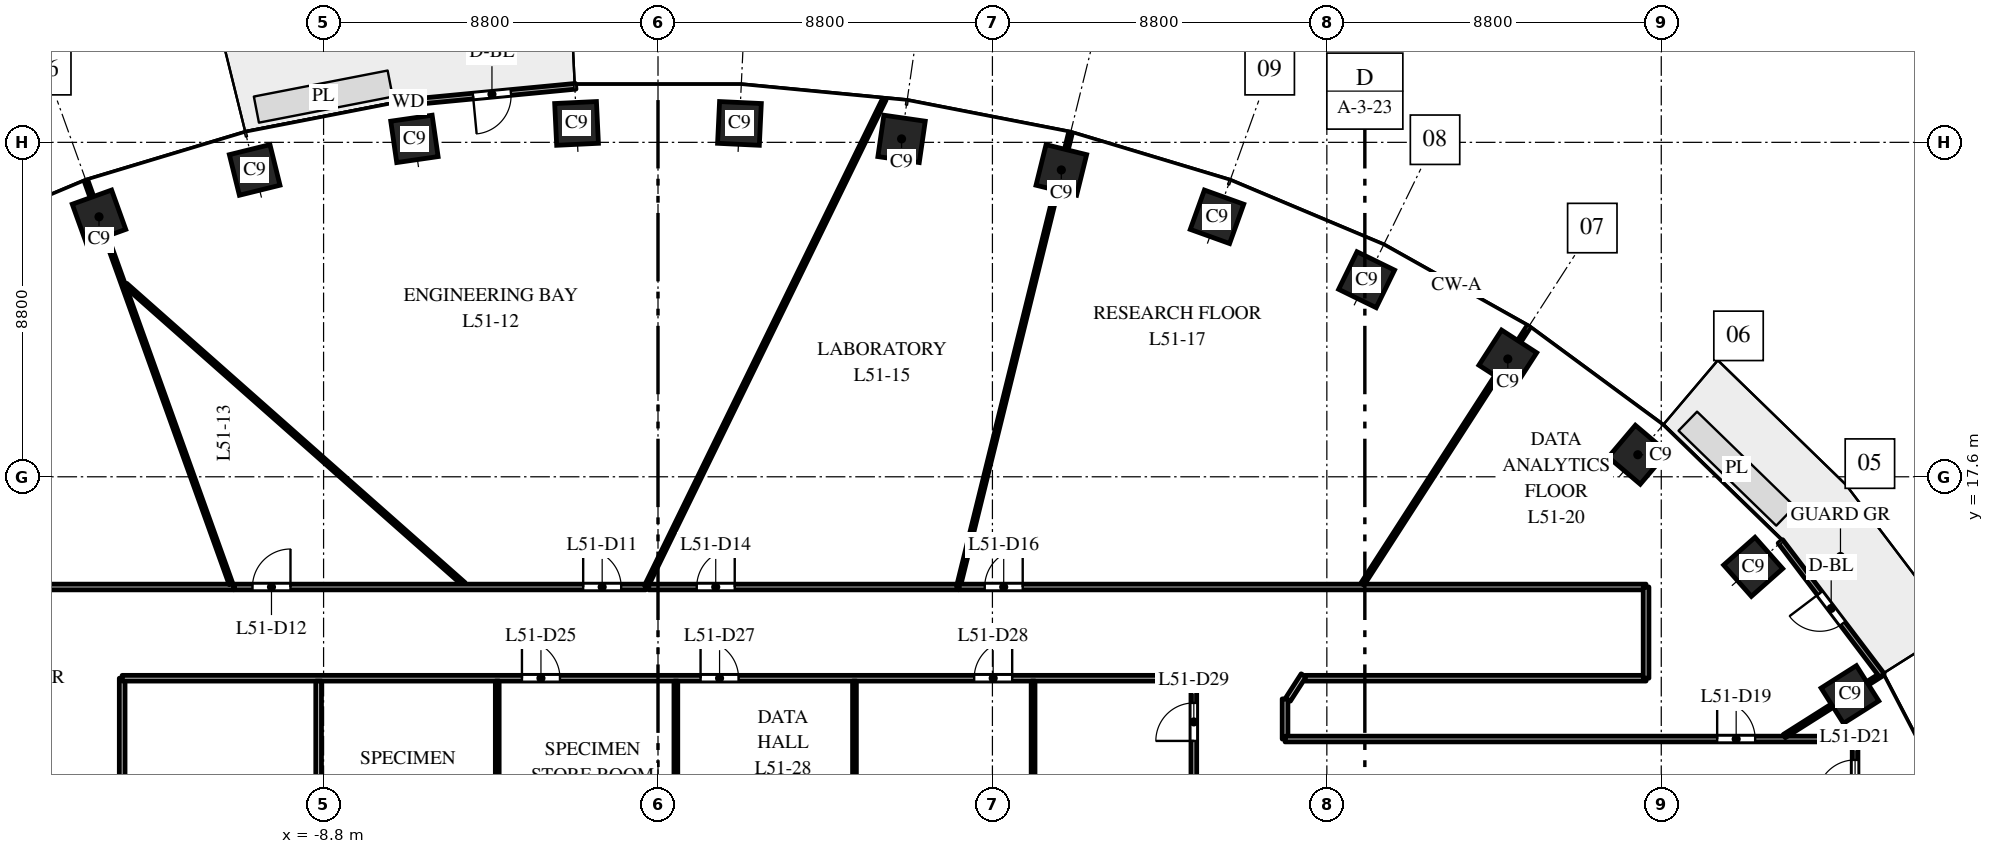
"""IFC4 building model, lengths in metres.
Left out: names, types, materials, properties, quantities, classifications, styles, units other than length and angle.
Written with IfcOpenShell. Run it as: python <this file> out.ifc"""

import sys

from ifc_helpers import new_model, si_unit, direction, frame, frame_2d, origin, origin_2d, place, context, subcontext, project, spatial, rectangle, extrude, element, fill, save


model = new_model("IFC4")
c1 = context("Model", 3, precision=1e-05, world=origin(), true_north=direction((0.0, 1.0)))
c2 = subcontext(c1, "Body", "Model", "MODEL_VIEW")
j1 = project(units=[si_unit("LENGTHUNIT", "METRE"), si_unit("PLANEANGLEUNIT", "RADIAN")], contexts=[c1])
p1 = place(None, origin())
s1 = spatial("IfcSite", under=j1, at=p1, CompositionType="ELEMENT")
p2 = place(p1, origin())
s2 = spatial("IfcBuilding", under=s1, at=p2, CompositionType="ELEMENT")
p3 = place(p2, frame((0.0, 0.0, 245.5)))
s3 = spatial("IfcBuildingStorey", under=s2, at=p3, CompositionType="ELEMENT", Elevation=245.5)
for number, where, z_axis, x_axis in (
    (1, (31.365, 11.871, 0.0), (0.0, 0.0, 1.0), (-0.535, 0.845, 0.0)),
    (2, (28.819, 15.23, 0.0), (0.0, 0.0, 1.0), (-0.663, 0.749, 0.0)),
    (3, (25.783, 18.18, 0.0), (0.0, 0.0, 1.0), (-0.763, 0.646, 0.0)),
    (4, (22.362, 20.7, 0.0), (0.0, 0.0, 1.0), (-0.84, 0.542, 0.0)),
    (5, (18.646, 22.785, 0.0), (0.0, 0.0, 1.0), (-0.898, 0.439, 0.0)),
    (6, (14.709, 24.441, 0.0), (0.0, 0.0, 1.0), (-0.941, 0.338, 0.0)),
    (7, (10.613, 25.674, 0.0), (0.0, 0.0, 1.0), (-0.971, 0.24, 0.0)),
    (8, (6.409, 26.491, 0.0), (0.0, 0.0, 1.0), (-0.99, 0.143, 0.0)),
    (9, (2.143, 26.898, 0.0), (0.0, 0.0, 1.0), (-0.999, 0.048, 0.0)),
    (10, (-2.143, 26.898, 0.0), (0.0, 0.0, 1.0), (-0.999, -0.048, 0.0)),
    (11, (-6.409, 26.491, 0.0), (0.0, 0.0, 1.0), (-0.99, -0.143, 0.0)),
    (12, (-10.613, 25.674, 0.0), (0.0, 0.0, 1.0), (-0.971, -0.24, 0.0)),
    (13, (-14.709, 24.441, 0.0), (0.0, 0.0, 1.0), (-0.941, -0.338, 0.0)),
):
    element("IfcColumn", number, at=place(p3, frame(where, z_axis=z_axis, x_axis=x_axis)), inside=s3, PredefinedType="COLUMN", context=c2, shape_type="SweptSolid", body=[
        extrude(rectangle(XDim=1.1, YDim=1.1, at=origin_2d()), origin(), (0.0, 0.0, 1.0), 4.0),
    ])
p4 = place(p3, frame((32.208, 12.374, 0.0), z_axis=(0.0, 0.0, 1.0), x_axis=(-0.604045763106, 0.796949632081, 0.0)))
e14 = element("IfcWall", 14, at=p4, inside=s3, PredefinedType="STANDARD", context=c2, shape_type="SweptSolid", body=[
    extrude(rectangle(XDim=4.423, YDim=0.15, at=frame_2d((2.212, 0.0))), origin(), (0.0, 0.0, 1.0), 3.7),
])
p5 = place(p4, frame((1.712, 0.0, 0.0)))
e15 = element("IfcOpeningElement", 15, at=p5, cuts=e14, PredefinedType="OPENING", context=c2, shape_type="SweptSolid", body=[
    extrude(rectangle(XDim=1.0, YDim=2.4, at=frame_2d((0.5, 1.2))), frame((0.0, 0.085, 0.0), z_axis=(0.0, -1.0, 0.0), x_axis=(1.0, 0.0, 0.0)), (0.0, 0.0, 1.0), 0.17),
])
p6 = place(p3, frame((-2.166, 27.875, 0.0), z_axis=(0.0, 0.0, 1.0), x_axis=(-0.995473879823, -0.095035543824, 0.0)))
e16 = element("IfcWall", 16, at=p6, inside=s3, PredefinedType="STANDARD", context=c2, shape_type="SweptSolid", body=[
    extrude(rectangle(XDim=4.426, YDim=0.15, at=frame_2d((2.213, 0.0))), origin(), (0.0, 0.0, 1.0), 3.7),
])
p7 = place(p6, frame((1.713, 0.0, 0.0)))
e17 = element("IfcOpeningElement", 17, at=p7, cuts=e16, PredefinedType="OPENING", context=c2, shape_type="SweptSolid", body=[
    extrude(rectangle(XDim=1.0, YDim=2.4, at=frame_2d((0.5, 1.2))), frame((0.0, 0.085, 0.0), z_axis=(0.0, -1.0, 0.0), x_axis=(1.0, 0.0, 0.0)), (0.0, 0.0, 1.0), 0.17),
])
p8 = place(p3, frame((-26.0, 14.7, 0.0), z_axis=(0.0, 0.0, 1.0), x_axis=(1.0, 0.0, 0.0)))
e18 = element("IfcWall", 18, at=p8, inside=s3, PredefinedType="PARTITIONING", context=c2, shape_type="SweptSolid", body=[
    extrude(rectangle(XDim=14.834, YDim=0.15, at=frame_2d((7.417, 0.0))), origin(), (0.0, 0.0, 1.0), 2.75),
])
p9 = place(p8, frame((3.643, 0.0, 0.0)))
e19 = element("IfcOpeningElement", 19, at=p9, cuts=e18, PredefinedType="OPENING", context=c2, shape_type="SweptSolid", body=[
    extrude(rectangle(XDim=1.0, YDim=2.1, at=frame_2d((0.5, 1.05))), frame((0.0, 0.085, 0.0), z_axis=(0.0, -1.0, 0.0), x_axis=(1.0, 0.0, 0.0)), (0.0, 0.0, 1.0), 0.17),
])
p10 = place(p3, frame((-15.048, 25.383, 0.0), z_axis=(0.0, 0.0, 1.0), x_axis=(0.338188533117, -0.941078379344, 0.0)))
e20 = element("IfcWall", 20, at=p10, inside=s3, PredefinedType="PARTITIONING", context=c2, shape_type="SweptSolid", body=[
    extrude(rectangle(XDim=11.269, YDim=0.1, at=frame_2d((5.635, 0.0))), origin(), (0.0, 0.0, 1.0), 3.0),
])
p11 = place(p3, frame((-14.1, -12.3, 0.0), z_axis=(0.0, 0.0, 1.0), x_axis=(0.0, 1.0, 0.0)))
e21 = element("IfcWall", 21, at=p11, inside=s3, PredefinedType="PARTITIONING", context=c2, shape_type="SweptSolid", body=[
    extrude(rectangle(XDim=24.6, YDim=0.15, at=frame_2d((12.3, 0.0))), origin(), (0.0, 0.0, 1.0), 2.75),
])
p12 = place(p11, frame((0.65, 0.0, 0.0)))
e22 = element("IfcOpeningElement", 22, at=p12, cuts=e21, PredefinedType="OPENING", context=c2, shape_type="SweptSolid", body=[
    extrude(rectangle(XDim=1.0, YDim=2.1, at=frame_2d((0.5, 1.05))), frame((0.0, 0.085, 0.0), z_axis=(0.0, -1.0, 0.0), x_axis=(1.0, 0.0, 0.0)), (0.0, 0.0, 1.0), 0.17),
])
p13 = place(p3, frame((-14.1, 12.3, 0.0), z_axis=(0.0, 0.0, 1.0), x_axis=(1.0, 0.0, 0.0)))
e23 = element("IfcWall", 23, at=p13, inside=s3, PredefinedType="PARTITIONING", context=c2, shape_type="SweptSolid", body=[
    extrude(rectangle(XDim=28.2, YDim=0.15, at=frame_2d((14.1, 0.0))), origin(), (0.0, 0.0, 1.0), 2.85),
])
p14 = place(p13, frame((10.52, 0.0, 0.0)))
e24 = element("IfcOpeningElement", 24, at=p14, cuts=e23, PredefinedType="OPENING", context=c2, shape_type="SweptSolid", body=[
    extrude(rectangle(XDim=1.0, YDim=2.1, at=frame_2d((0.5, 1.05))), frame((0.0, 0.085, 0.0), z_axis=(0.0, -1.0, 0.0), x_axis=(1.0, 0.0, 0.0)), (0.0, 0.0, 1.0), 0.17),
])
p15 = place(p13, frame((15.22, 0.0, 0.0)))
e25 = element("IfcOpeningElement", 25, at=p15, cuts=e23, PredefinedType="OPENING", context=c2, shape_type="SweptSolid", body=[
    extrude(rectangle(XDim=1.0, YDim=2.1, at=frame_2d((0.5, 1.05))), frame((0.0, 0.085, 0.0), z_axis=(0.0, -1.0, 0.0), x_axis=(1.0, 0.0, 0.0)), (0.0, 0.0, 1.0), 0.17),
])
p16 = place(p13, frame((22.42, 0.0, 0.0)))
e26 = element("IfcOpeningElement", 26, at=p16, cuts=e23, PredefinedType="OPENING", context=c2, shape_type="SweptSolid", body=[
    extrude(rectangle(XDim=1.0, YDim=2.1, at=frame_2d((0.5, 1.05))), frame((0.0, 0.085, 0.0), z_axis=(0.0, -1.0, 0.0), x_axis=(1.0, 0.0, 0.0)), (0.0, 0.0, 1.0), 0.17),
])
p17 = place(p3, frame((-14.014, 22.654, 0.0), z_axis=(0.0, 0.0, 1.0), x_axis=(0.749061235459, -0.66250076644, 0.0)))
e27 = element("IfcWall", 27, at=p17, inside=s3, PredefinedType="PARTITIONING", context=c2, shape_type="SweptSolid", body=[
    extrude(rectangle(XDim=11.888, YDim=0.1, at=frame_2d((5.944, 0.0))), origin(), (0.0, 0.0, 1.0), 2.85),
])
p18 = place(p3, frame((-11.154, 14.7, 0.0), z_axis=(0.0, 0.0, 1.0), x_axis=(1.0, 0.0, 0.0)))
e28 = element("IfcWall", 28, at=p18, inside=s3, PredefinedType="PARTITIONING", context=c2, shape_type="SweptSolid", body=[
    extrude(rectangle(XDim=10.835, YDim=0.15, at=frame_2d((5.417, 0.0))), origin(), (0.0, 0.0, 1.0), 2.85),
])
p19 = place(p18, frame((9.185, 0.0, 0.0)))
e29 = element("IfcOpeningElement", 29, at=p19, cuts=e28, PredefinedType="OPENING", context=c2, shape_type="SweptSolid", body=[
    extrude(rectangle(XDim=1.0, YDim=2.1, at=frame_2d((0.5, 1.05))), frame((0.0, 0.085, 0.0), z_axis=(0.0, -1.0, 0.0), x_axis=(1.0, 0.0, 0.0)), (0.0, 0.0, 1.0), 0.17),
])
p20 = place(p18, frame((0.483, 0.0, 0.0)))
e30 = element("IfcOpeningElement", 30, at=p20, cuts=e28, PredefinedType="OPENING", context=c2, shape_type="SweptSolid", body=[
    extrude(rectangle(XDim=1.0, YDim=2.1, at=frame_2d((0.5, 1.05))), frame((0.0, 0.085, 0.0), z_axis=(0.0, -1.0, 0.0), x_axis=(1.0, 0.0, 0.0)), (0.0, 0.0, 1.0), 0.17),
])
p21 = place(p3, frame((-8.93, 0.518, 0.0), z_axis=(0.0, 0.0, 1.0), x_axis=(0.0, 1.0, 0.0)))
e31 = element("IfcWall", 31, at=p21, inside=s3, PredefinedType="PARTITIONING", context=c2, shape_type="SweptSolid", body=[
    extrude(rectangle(XDim=11.707, YDim=0.15, at=frame_2d((5.854, 0.0))), origin(), (0.0, 0.0, 1.0), 2.75),
])
p22 = place(p21, frame((4.11, 0.0, 0.0)))
e32 = element("IfcOpeningElement", 32, at=p22, cuts=e31, PredefinedType="OPENING", context=c2, shape_type="SweptSolid", body=[
    extrude(rectangle(XDim=1.0, YDim=2.1, at=frame_2d((0.5, 1.05))), frame((0.0, 0.085, 0.0), z_axis=(0.0, -1.0, 0.0), x_axis=(1.0, 0.0, 0.0)), (0.0, 0.0, 1.0), 0.17),
])
p23 = place(p3, frame((-4.23, 6.592, 0.0), z_axis=(0.0, 0.0, 1.0), x_axis=(0.0, 1.0, 0.0)))
e33 = element("IfcWall", 33, at=p23, inside=s3, PredefinedType="PARTITIONING", context=c2, shape_type="SweptSolid", body=[
    extrude(rectangle(XDim=5.633, YDim=0.1, at=frame_2d((2.816, 0.0))), origin(), (0.0, 0.0, 1.0), 2.85),
])
p24 = place(p3, frame((-0.312, 14.716, 0.0), z_axis=(0.0, 0.0, 1.0), x_axis=(0.439293576349, 0.898343561105, 0.0)))
e34 = element("IfcWall", 34, at=p24, inside=s3, PredefinedType="PARTITIONING", context=c2, shape_type="SweptSolid", body=[
    extrude(rectangle(XDim=14.273, YDim=0.1, at=frame_2d((7.136, 0.0))), origin(), (0.0, 0.0, 1.0), 3.0),
])
p25 = place(p3, frame((-0.244, 14.7, 0.0), z_axis=(0.0, 0.0, 1.0), x_axis=(1.0, 0.0, 0.0)))
e35 = element("IfcWall", 35, at=p25, inside=s3, PredefinedType="PARTITIONING", context=c2, shape_type="SweptSolid", body=[
    extrude(rectangle(XDim=8.147, YDim=0.15, at=frame_2d((4.073, 0.0))), origin(), (0.0, 0.0, 1.0), 2.85),
])
p26 = place(p25, frame((1.263, 0.0, 0.0)))
e36 = element("IfcOpeningElement", 36, at=p26, cuts=e35, PredefinedType="OPENING", context=c2, shape_type="SweptSolid", body=[
    extrude(rectangle(XDim=1.0, YDim=2.1, at=frame_2d((0.5, 1.05))), frame((0.0, 0.085, 0.0), z_axis=(0.0, -1.0, 0.0), x_axis=(1.0, 0.0, 0.0)), (0.0, 0.0, 1.0), 0.17),
])
p27 = place(p3, frame((0.47, 7.469, 0.0), z_axis=(0.0, 0.0, 1.0), x_axis=(0.0, 1.0, 0.0)))
e37 = element("IfcWall", 37, at=p27, inside=s3, PredefinedType="PARTITIONING", context=c2, shape_type="SweptSolid", body=[
    extrude(rectangle(XDim=4.756, YDim=0.1, at=frame_2d((2.378, 0.0))), origin(), (0.0, 0.0, 1.0), 3.0),
])
p28 = place(p3, frame((5.17, 6.105, 0.0), z_axis=(0.0, 0.0, 1.0), x_axis=(0.0, 1.0, 0.0)))
e38 = element("IfcWall", 38, at=p28, inside=s3, PredefinedType="PARTITIONING", context=c2, shape_type="SweptSolid", body=[
    extrude(rectangle(XDim=6.12, YDim=0.1, at=frame_2d((3.06, 0.0))), origin(), (0.0, 0.0, 1.0), 2.85),
])
p29 = place(p3, frame((7.903, 14.7, 0.0), z_axis=(0.0, 0.0, 1.0), x_axis=(0.239738210493, 0.9708375716, 0.0)))
e39 = element("IfcWall", 39, at=p29, inside=s3, PredefinedType="PARTITIONING", context=c2, shape_type="SweptSolid", body=[
    extrude(rectangle(XDim=12.305, YDim=0.1, at=frame_2d((6.152, 0.0))), origin(), (0.0, 0.0, 1.0), 3.0),
])
p30 = place(p3, frame((7.919, 14.7, 0.0), z_axis=(0.0, 0.0, 1.0), x_axis=(1.0, 0.0, 0.0)))
e40 = element("IfcWall", 40, at=p30, inside=s3, PredefinedType="PARTITIONING", context=c2, shape_type="SweptSolid", body=[
    extrude(rectangle(XDim=18.081, YDim=0.15, at=frame_2d((9.041, 0.0))), origin(), (0.0, 0.0, 1.0), 2.85),
])
p31 = place(p30, frame((0.678, 0.0, 0.0)))
e41 = element("IfcOpeningElement", 41, at=p31, cuts=e40, PredefinedType="OPENING", context=c2, shape_type="SweptSolid", body=[
    extrude(rectangle(XDim=1.0, YDim=2.1, at=frame_2d((0.5, 1.05))), frame((0.0, 0.085, 0.0), z_axis=(0.0, -1.0, 0.0), x_axis=(1.0, 0.0, 0.0)), (0.0, 0.0, 1.0), 0.17),
])
p32 = place(p3, frame((9.87, -12.225, 0.0), z_axis=(0.0, 0.0, 1.0), x_axis=(0.0, 1.0, 0.0)))
e42 = element("IfcWall", 42, at=p32, inside=s3, PredefinedType="PARTITIONING", context=c2, shape_type="SweptSolid", body=[
    extrude(rectangle(XDim=24.45, YDim=0.1, at=frame_2d((12.225, 0.0))), origin(), (0.0, 0.0, 1.0), 2.75),
])
p33 = place(p3, frame((14.1, -12.3, 0.0), z_axis=(0.0, 0.0, 1.0), x_axis=(0.0, 1.0, 0.0)))
e43 = element("IfcWall", 43, at=p33, inside=s3, PredefinedType="PARTITIONING", context=c2, shape_type="SweptSolid", body=[
    extrude(rectangle(XDim=24.6, YDim=0.15, at=frame_2d((12.3, 0.0))), origin(), (0.0, 0.0, 1.0), 2.75),
])
p34 = place(p33, frame((22.95, 0.0, 0.0)))
e44 = element("IfcOpeningElement", 44, at=p34, cuts=e43, PredefinedType="OPENING", context=c2, shape_type="SweptSolid", body=[
    extrude(rectangle(XDim=1.0, YDim=2.1, at=frame_2d((0.5, 1.05))), frame((0.0, 0.085, 0.0), z_axis=(0.0, -1.0, 0.0), x_axis=(1.0, 0.0, 0.0)), (0.0, 0.0, 1.0), 0.17),
])
p35 = place(p3, frame((16.5, 10.7, 0.0), z_axis=(0.0, 0.0, 1.0), x_axis=(0.0, 1.0, 0.0)))
e45 = element("IfcWall", 45, at=p35, inside=s3, PredefinedType="PARTITIONING", context=c2, shape_type="SweptSolid", body=[
    extrude(rectangle(XDim=1.056, YDim=0.15, at=frame_2d((0.528, 0.0))), origin(), (0.0, 0.0, 1.0), 3.7),
])
p36 = place(p3, frame((16.5, 10.7, 0.0), z_axis=(0.0, 0.0, 1.0), x_axis=(1.0, 0.0, 0.0)))
e46 = element("IfcWall", 46, at=p36, inside=s3, PredefinedType="PARTITIONING", context=c2, shape_type="SweptSolid", body=[
    extrude(rectangle(XDim=15.0, YDim=0.15, at=frame_2d((7.5, 0.0))), origin(), (0.0, 0.0, 1.0), 2.75),
])
p37 = place(p36, frame((11.371, 0.0, 0.0)))
e47 = element("IfcOpeningElement", 47, at=p37, cuts=e46, PredefinedType="OPENING", context=c2, shape_type="SweptSolid", body=[
    extrude(rectangle(XDim=1.0, YDim=2.1, at=frame_2d((0.5, 1.05))), frame((0.0, 0.085, 0.0), z_axis=(0.0, -1.0, 0.0), x_axis=(1.0, 0.0, 0.0)), (0.0, 0.0, 1.0), 0.17),
])
p38 = place(p3, frame((16.577, 11.737, 0.0), z_axis=(0.0, 0.0, 1.0), x_axis=(0.541716486253, 0.840561269939, 0.0)))
e48 = element("IfcWall", 48, at=p38, inside=s3, PredefinedType="PARTITIONING", context=c2, shape_type="SweptSolid", body=[
    extrude(rectangle(XDim=0.759, YDim=0.15, at=frame_2d((0.379, 0.0))), origin(), (0.0, 0.0, 1.0), 3.7),
])
p39 = place(p3, frame((17.029, 12.3, 0.0), z_axis=(0.0, 0.0, 1.0), x_axis=(1.0, 0.0, 0.0)))
e49 = element("IfcWall", 49, at=p39, inside=s3, PredefinedType="PARTITIONING", context=c2, shape_type="SweptSolid", body=[
    extrude(rectangle(XDim=8.971, YDim=0.15, at=frame_2d((4.485, 0.0))), origin(), (0.0, 0.0, 1.0), 2.75),
])
p40 = place(p3, frame((18.538, 14.775, 0.0), z_axis=(0.0, 0.0, 1.0), x_axis=(0.542221460331, 0.840235614549, 0.0)))
e50 = element("IfcWall", 50, at=p40, inside=s3, PredefinedType="PARTITIONING", context=c2, shape_type="SweptSolid", body=[
    extrude(rectangle(XDim=8.054, YDim=0.1, at=frame_2d((4.027, 0.0))), origin(), (0.0, 0.0, 1.0), 3.7),
])
p41 = place(p3, frame((26.0, 12.3, 0.0), z_axis=(0.0, 0.0, 1.0), x_axis=(0.0, 1.0, 0.0)))
e51 = element("IfcWall", 51, at=p41, inside=s3, PredefinedType="PARTITIONING", context=c2, shape_type="SweptSolid", body=[
    extrude(rectangle(XDim=2.4, YDim=0.15, at=frame_2d((1.2, 0.0))), origin(), (0.0, 0.0, 1.0), 2.75),
])
p42 = place(p3, frame((29.637, 10.777, 0.0), z_axis=(0.0, 0.0, 1.0), x_axis=(0.844810627195, 0.535065420467, 0.0)))
e52 = element("IfcWall", 52, at=p42, inside=s3, PredefinedType="PARTITIONING", context=c2, shape_type="SweptSolid", body=[
    extrude(rectangle(XDim=3.048, YDim=0.1, at=frame_2d((1.524, 0.0))), origin(), (0.0, 0.0, 1.0), 3.0),
])
p43 = place(p3, frame((31.5, 8.5, 0.0), z_axis=(0.0, 0.0, 1.0), x_axis=(0.0, 1.0, 0.0)))
e53 = element("IfcWall", 53, at=p43, inside=s3, PredefinedType="PARTITIONING", context=c2, shape_type="SweptSolid", body=[
    extrude(rectangle(XDim=2.2, YDim=0.15, at=frame_2d((1.1, 0.0))), origin(), (0.0, 0.0, 1.0), 3.0),
])
p44 = place(p43, frame((0.65, 0.0, 0.0)))
e54 = element("IfcOpeningElement", 54, at=p44, cuts=e53, PredefinedType="OPENING", context=c2, shape_type="SweptSolid", body=[
    extrude(rectangle(XDim=1.0, YDim=2.1, at=frame_2d((0.5, 1.05))), frame((0.0, 0.085, 0.0), z_axis=(0.0, -1.0, 0.0), x_axis=(1.0, 0.0, 0.0)), (0.0, 0.0, 1.0), 0.17),
])
p45 = place(p5, origin())
e55 = element("IfcDoor", 55, at=p45, inside=s3, OperationType="SINGLE_SWING_RIGHT", PredefinedType="DOOR", context=c2, shape_type="SweptSolid", body=[
    extrude(rectangle(XDim=1.0, YDim=2.4, at=frame_2d((0.5, 1.2))), frame((0.0, 0.025, 0.0), z_axis=(0.0, -1.0, 0.0), x_axis=(1.0, 0.0, 0.0)), (0.0, 0.0, 1.0), 0.05),
])
fill(e15, e55)
p46 = place(p7, origin())
e56 = element("IfcDoor", 56, at=p46, inside=s3, OperationType="SINGLE_SWING_RIGHT", PredefinedType="DOOR", context=c2, shape_type="SweptSolid", body=[
    extrude(rectangle(XDim=1.0, YDim=2.4, at=frame_2d((0.5, 1.2))), frame((0.0, 0.025, 0.0), z_axis=(0.0, -1.0, 0.0), x_axis=(1.0, 0.0, 0.0)), (0.0, 0.0, 1.0), 0.05),
])
fill(e17, e56)
p47 = place(p19, origin())
e57 = element("IfcDoor", 57, at=p47, inside=s3, OperationType="SINGLE_SWING_LEFT", PredefinedType="DOOR", context=c2, shape_type="SweptSolid", body=[
    extrude(rectangle(XDim=1.0, YDim=2.1, at=frame_2d((0.5, 1.05))), frame((0.0, 0.025, 0.0), z_axis=(0.0, -1.0, 0.0), x_axis=(1.0, 0.0, 0.0)), (0.0, 0.0, 1.0), 0.05),
])
fill(e29, e57)
p48 = place(p20, origin())
e58 = element("IfcDoor", 58, at=p48, inside=s3, OperationType="SINGLE_SWING_RIGHT", PredefinedType="DOOR", context=c2, shape_type="SweptSolid", body=[
    extrude(rectangle(XDim=1.0, YDim=2.1, at=frame_2d((0.5, 1.05))), frame((0.0, 0.025, 0.0), z_axis=(0.0, -1.0, 0.0), x_axis=(1.0, 0.0, 0.0)), (0.0, 0.0, 1.0), 0.05),
])
fill(e30, e58)
p49 = place(p26, origin())
e59 = element("IfcDoor", 59, at=p49, inside=s3, OperationType="SINGLE_SWING_RIGHT", PredefinedType="DOOR", context=c2, shape_type="SweptSolid", body=[
    extrude(rectangle(XDim=1.0, YDim=2.1, at=frame_2d((0.5, 1.05))), frame((0.0, 0.025, 0.0), z_axis=(0.0, -1.0, 0.0), x_axis=(1.0, 0.0, 0.0)), (0.0, 0.0, 1.0), 0.05),
])
fill(e36, e59)
p50 = place(p31, origin())
e60 = element("IfcDoor", 60, at=p50, inside=s3, OperationType="SINGLE_SWING_RIGHT", PredefinedType="DOOR", context=c2, shape_type="SweptSolid", body=[
    extrude(rectangle(XDim=1.0, YDim=2.1, at=frame_2d((0.5, 1.05))), frame((0.0, 0.025, 0.0), z_axis=(0.0, -1.0, 0.0), x_axis=(1.0, 0.0, 0.0)), (0.0, 0.0, 1.0), 0.05),
])
fill(e41, e60)
p51 = place(p37, origin())
e61 = element("IfcDoor", 61, at=p51, inside=s3, OperationType="SINGLE_SWING_LEFT", PredefinedType="DOOR", context=c2, shape_type="SweptSolid", body=[
    extrude(rectangle(XDim=1.0, YDim=2.1, at=frame_2d((0.5, 1.05))), frame((0.0, 0.025, 0.0), z_axis=(0.0, -1.0, 0.0), x_axis=(1.0, 0.0, 0.0)), (0.0, 0.0, 1.0), 0.05),
])
fill(e47, e61)
p52 = place(p44, origin())
e62 = element("IfcDoor", 62, at=p52, inside=s3, OperationType="SINGLE_SWING_LEFT", PredefinedType="DOOR", context=c2, shape_type="SweptSolid", body=[
    extrude(rectangle(XDim=1.0, YDim=2.1, at=frame_2d((0.5, 1.05))), frame((0.0, 0.025, 0.0), z_axis=(0.0, -1.0, 0.0), x_axis=(1.0, 0.0, 0.0)), (0.0, 0.0, 1.0), 0.05),
])
fill(e54, e62)
p53 = place(p14, origin())
e63 = element("IfcDoor", 63, at=p53, inside=s3, OperationType="SINGLE_SWING_LEFT", PredefinedType="DOOR", context=c2, shape_type="SweptSolid", body=[
    extrude(rectangle(XDim=1.0, YDim=2.1, at=frame_2d((0.5, 1.05))), frame((0.0, 0.025, 0.0), z_axis=(0.0, -1.0, 0.0), x_axis=(1.0, 0.0, 0.0)), (0.0, 0.0, 1.0), 0.05),
])
fill(e24, e63)
p54 = place(p15, origin())
e64 = element("IfcDoor", 64, at=p54, inside=s3, OperationType="SINGLE_SWING_LEFT", PredefinedType="DOOR", context=c2, shape_type="SweptSolid", body=[
    extrude(rectangle(XDim=1.0, YDim=2.1, at=frame_2d((0.5, 1.05))), frame((0.0, 0.025, 0.0), z_axis=(0.0, -1.0, 0.0), x_axis=(1.0, 0.0, 0.0)), (0.0, 0.0, 1.0), 0.05),
])
fill(e25, e64)
p55 = place(p16, origin())
e65 = element("IfcDoor", 65, at=p55, inside=s3, OperationType="SINGLE_SWING_RIGHT", PredefinedType="DOOR", context=c2, shape_type="SweptSolid", body=[
    extrude(rectangle(XDim=1.0, YDim=2.1, at=frame_2d((0.5, 1.05))), frame((0.0, 0.025, 0.0), z_axis=(0.0, -1.0, 0.0), x_axis=(1.0, 0.0, 0.0)), (0.0, 0.0, 1.0), 0.05),
])
fill(e26, e65)
p56 = place(p34, origin())
e66 = element("IfcDoor", 66, at=p56, inside=s3, OperationType="SINGLE_SWING_LEFT", PredefinedType="DOOR", context=c2, shape_type="SweptSolid", body=[
    extrude(rectangle(XDim=1.0, YDim=2.1, at=frame_2d((0.5, 1.05))), frame((0.0, 0.025, 0.0), z_axis=(0.0, -1.0, 0.0), x_axis=(1.0, 0.0, 0.0)), (0.0, 0.0, 1.0), 0.05),
])
fill(e44, e66)
save(model, sys.argv[1])
